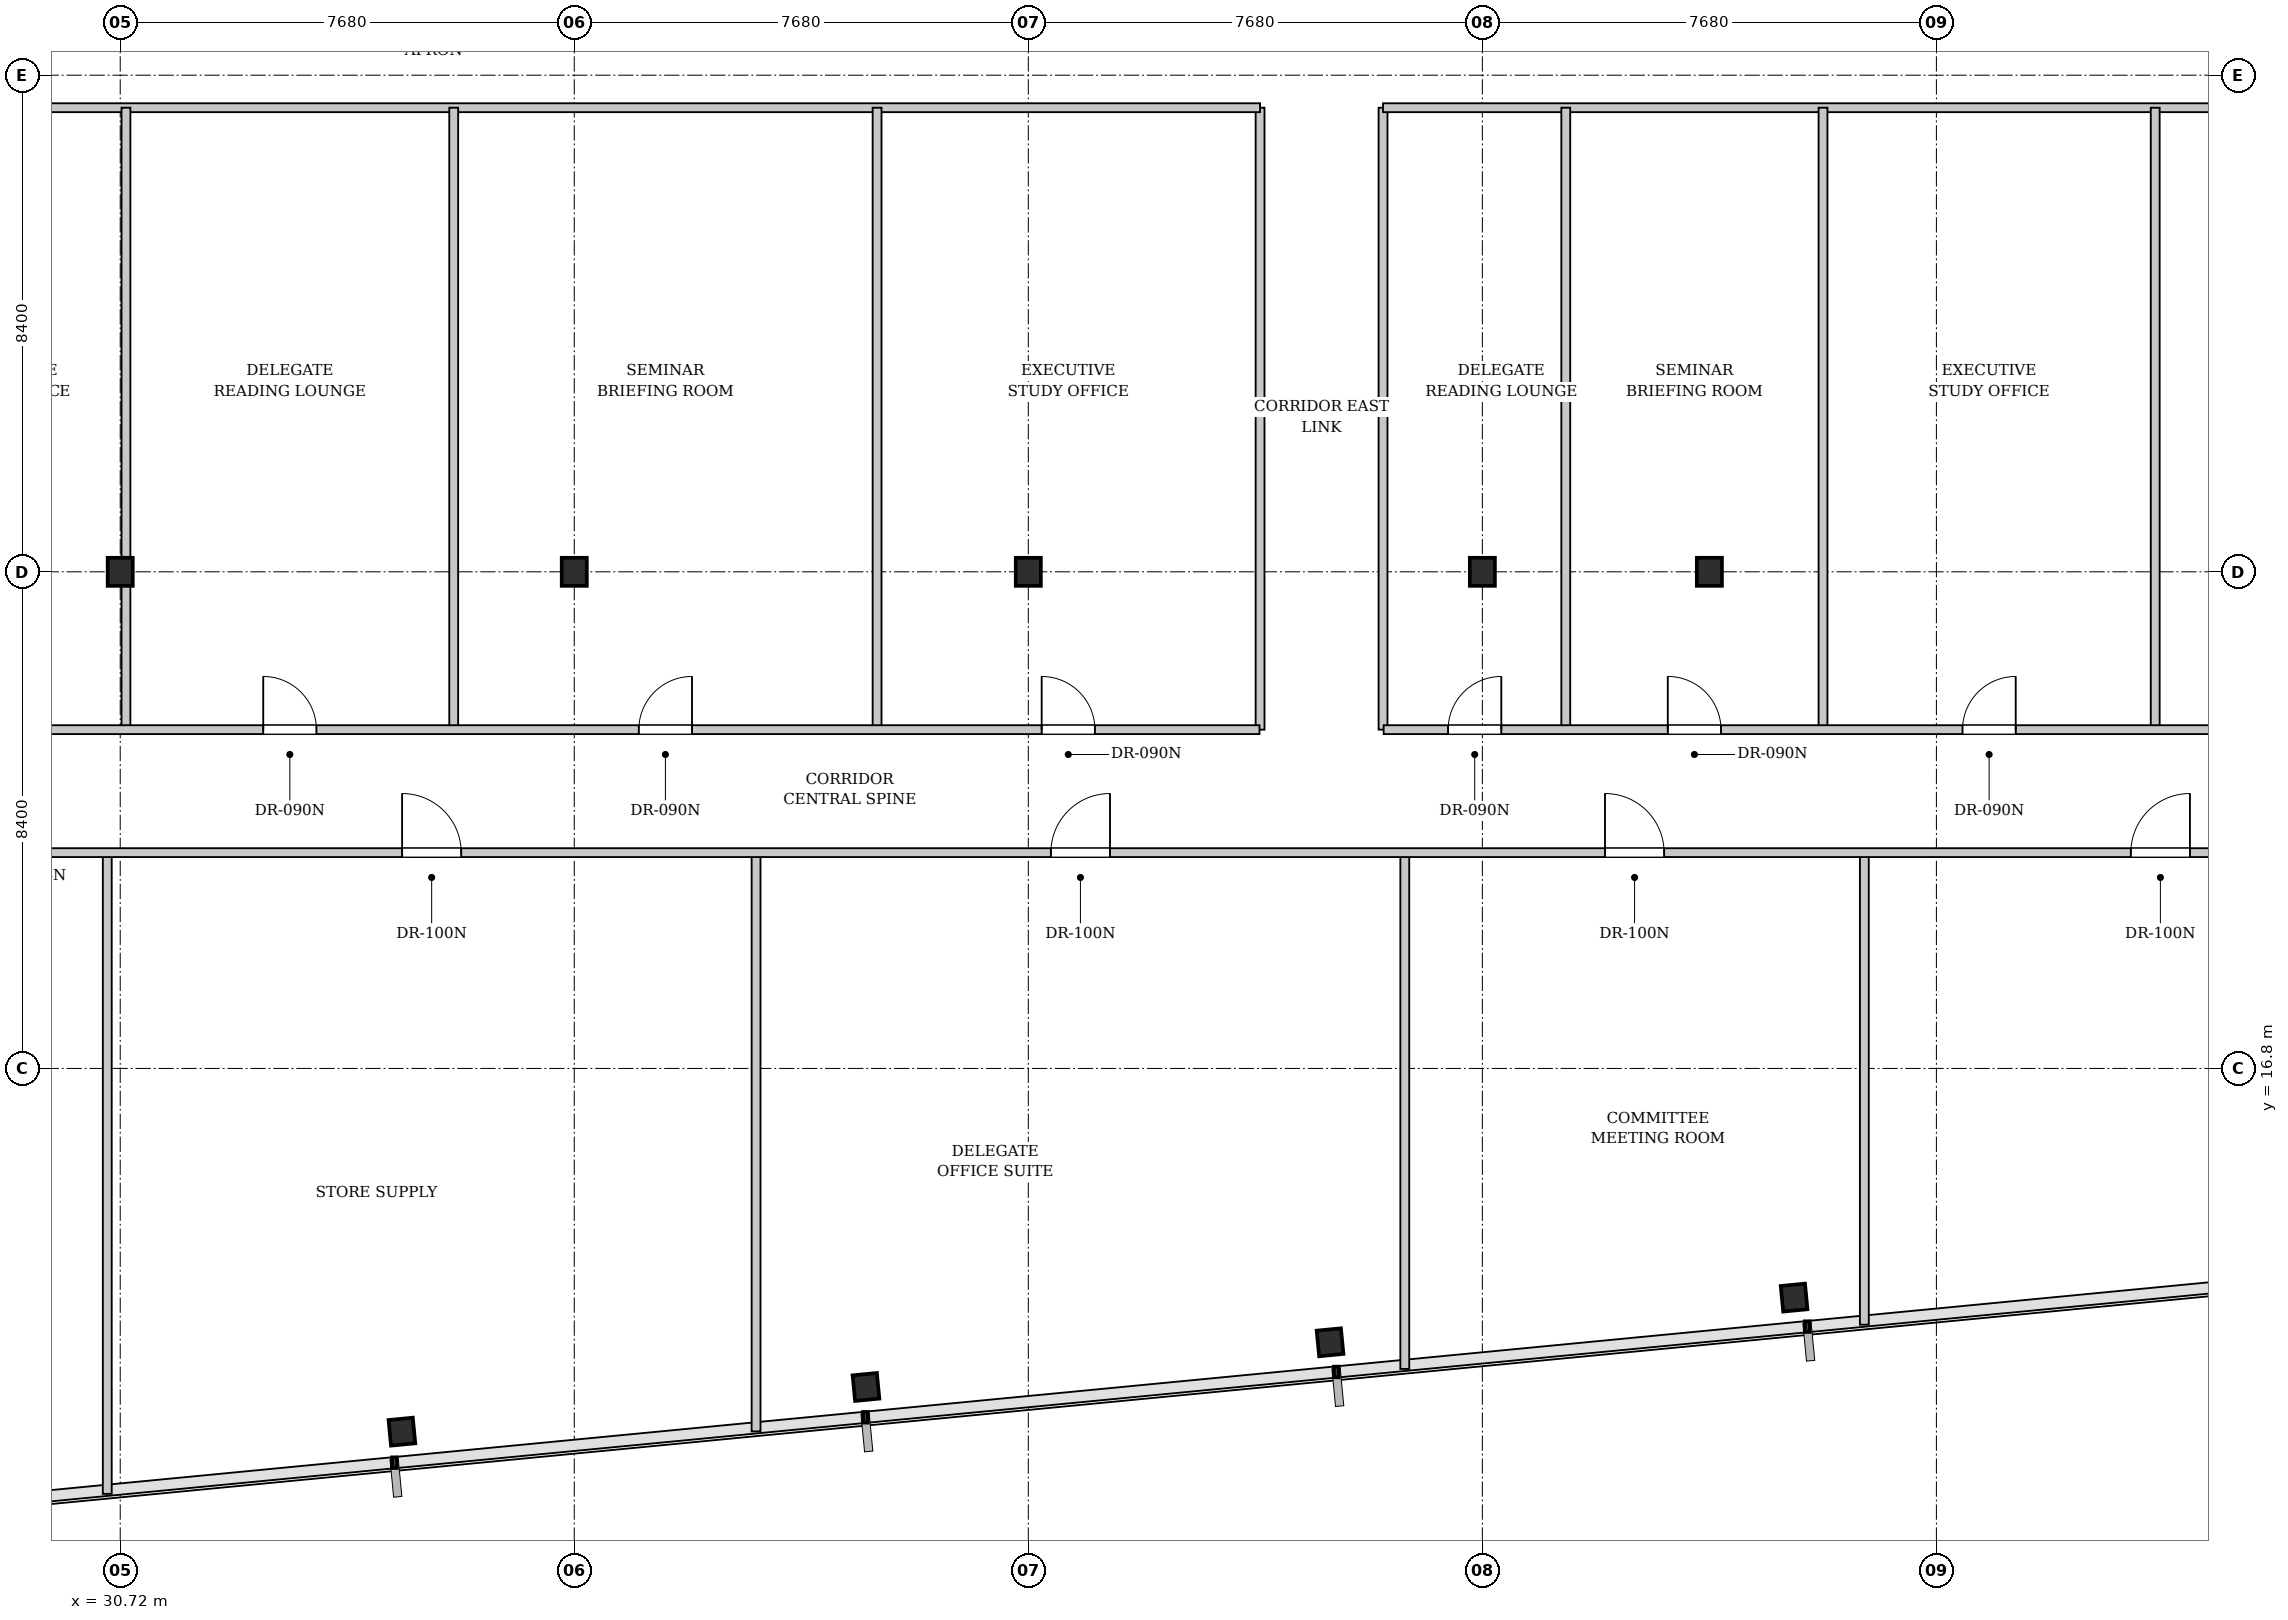
"""IFC4 building model, lengths in metres.
Left out: names, types, materials, properties, quantities, classifications, styles, units other than length and angle.
Written with IfcOpenShell. Run it as: python <this file> out.ifc"""

import sys

from ifc_helpers import new_model, si_unit, direction, frame, frame_2d, origin, origin_2d, place, context, subcontext, project, spatial, rectangle, i_section, extrude, element, fill, save


model = new_model("IFC4")
c1 = context("Model", 3, precision=1e-05, world=origin(), true_north=direction((0.0, 1.0)))
c2 = subcontext(c1, "Body", "Model", "MODEL_VIEW")
j1 = project(units=[si_unit("LENGTHUNIT", "METRE"), si_unit("PLANEANGLEUNIT", "RADIAN")], contexts=[c1])
p1 = place(None, origin())
s1 = spatial("IfcSite", under=j1, at=p1, CompositionType="ELEMENT")
p2 = place(p1, origin())
s2 = spatial("IfcBuilding", under=s1, at=p2, CompositionType="ELEMENT")
p3 = place(p2, frame((0.0, 0.0, 123.7)))
s3 = spatial("IfcBuildingStorey", under=s2, at=p3, CompositionType="ELEMENT", Elevation=123.7)
for number, where, z_axis, x_axis in (
    (1, (30.72, 25.2, 0.0), (0.0, 0.0, 1.0), (1.0, 0.0, 0.0)),
    (2, (38.4, 25.2, 0.0), (0.0, 0.0, 1.0), (1.0, 0.0, 0.0)),
    (3, (46.08, 25.2, 0.0), (0.0, 0.0, 1.0), (1.0, 0.0, 0.0)),
    (4, (53.76, 25.2, 0.0), (0.0, 0.0, 1.0), (1.0, 0.0, 0.0)),
    (5, (57.6, 25.2, 0.0), (0.0, 0.0, 1.0), (1.0, 0.0, 0.0)),
):
    element("IfcColumn", number, at=place(p3, frame(where, z_axis=z_axis, x_axis=x_axis)), inside=s3, PredefinedType="COLUMN", context=c2, shape_type="SweptSolid", body=[
        extrude(i_section(OverallWidth=0.424, OverallDepth=0.474, WebThickness=0.047, FlangeThickness=0.077, FilletRadius=0.015, at=origin_2d()), origin(), (0.0, 0.0, 1.0), 3.4),
    ])
for number, where, z_axis, x_axis in (
    (6, (35.485, 10.656, 0.0), (0.0, 0.0, 1.0), (0.995, 0.096, 0.0)),
    (7, (43.334, 11.412, 0.0), (0.0, 0.0, 1.0), (0.995, 0.096, 0.0)),
    (8, (51.184, 12.167, 0.0), (0.0, 0.0, 1.0), (0.995, 0.096, 0.0)),
    (9, (59.033, 12.923, 0.0), (0.0, 0.0, 1.0), (0.995, 0.096, 0.0)),
):
    element("IfcColumn", number, at=place(p3, frame(where, z_axis=z_axis, x_axis=x_axis)), inside=s3, PredefinedType="COLUMN", context=c2, shape_type="SweptSolid", body=[
        extrude(i_section(OverallWidth=0.412, OverallDepth=0.435, WebThickness=0.036, FlangeThickness=0.058, FilletRadius=0.015, at=origin_2d()), origin(), (0.0, 0.0, 1.0), 3.4),
    ])
p4 = place(p3, frame((30.501, 9.604, 0.0), z_axis=(0.0, 0.0, 1.0), x_axis=(0.0, 1.0, 0.0)))
e10 = element("IfcWall", 10, at=p4, inside=s3, PredefinedType="PARTITIONING", context=c2, shape_type="SweptSolid", body=[
    extrude(rectangle(XDim=10.866, YDim=0.15, at=frame_2d((5.433, 0.0))), origin(), (0.0, 0.0, 1.0), 3.18),
])
p5 = place(p3, frame((41.475, 10.66, 0.0), z_axis=(0.0, 0.0, 1.0), x_axis=(0.0, 1.0, 0.0)))
e11 = element("IfcWall", 11, at=p5, inside=s3, PredefinedType="PARTITIONING", context=c2, shape_type="SweptSolid", body=[
    extrude(rectangle(XDim=9.81, YDim=0.15, at=frame_2d((4.905, 0.0))), origin(), (0.0, 0.0, 1.0), 3.18),
])
p6 = place(p3, frame((52.448, 11.717, 0.0), z_axis=(0.0, 0.0, 1.0), x_axis=(0.0, 1.0, 0.0)))
e12 = element("IfcWall", 12, at=p6, inside=s3, PredefinedType="PARTITIONING", context=c2, shape_type="SweptSolid", body=[
    extrude(rectangle(XDim=8.753, YDim=0.15, at=frame_2d((4.376, 0.0))), origin(), (0.0, 0.0, 1.0), 2.525),
])
p7 = place(p3, frame((60.221, 12.465, 0.0), z_axis=(0.0, 0.0, 1.0), x_axis=(0.0, 1.0, 0.0)))
e13 = element("IfcWall", 13, at=p7, inside=s3, PredefinedType="PARTITIONING", context=c2, shape_type="SweptSolid", body=[
    extrude(rectangle(XDim=8.005, YDim=0.15, at=frame_2d((4.002, 0.0))), origin(), (0.0, 0.0, 1.0), 3.18),
])
p8 = place(p3, frame((15.814, 20.45, 0.0), z_axis=(0.0, 0.0, 1.0), x_axis=(1.0, 0.0, 0.0)))
e14 = element("IfcWall", 14, at=p8, inside=s3, PredefinedType="PARTITIONING", context=c2, shape_type="SweptSolid", body=[
    extrude(rectangle(XDim=61.222, YDim=0.15, at=frame_2d((30.611, 0.0))), origin(), (0.0, 0.0, 1.0), 3.18),
])
p9 = place(p8, frame((9.243, 0.0, 0.0)))
e15 = element("IfcOpeningElement", 15, at=p9, cuts=e14, PredefinedType="OPENING", context=c2, shape_type="SweptSolid", body=[
    extrude(rectangle(XDim=1.0, YDim=2.15, at=frame_2d((0.5, 1.075))), frame((0.0, 0.085, 0.0), z_axis=(0.0, -1.0, 0.0), x_axis=(1.0, 0.0, 0.0)), (0.0, 0.0, 1.0), 0.17),
])
p10 = place(p8, frame((19.674, 0.0, 0.0)))
e16 = element("IfcOpeningElement", 16, at=p10, cuts=e14, PredefinedType="OPENING", context=c2, shape_type="SweptSolid", body=[
    extrude(rectangle(XDim=1.0, YDim=2.15, at=frame_2d((0.5, 1.075))), frame((0.0, 0.085, 0.0), z_axis=(0.0, -1.0, 0.0), x_axis=(1.0, 0.0, 0.0)), (0.0, 0.0, 1.0), 0.17),
])
p11 = place(p8, frame((30.647, 0.0, 0.0)))
e17 = element("IfcOpeningElement", 17, at=p11, cuts=e14, PredefinedType="OPENING", context=c2, shape_type="SweptSolid", body=[
    extrude(rectangle(XDim=1.0, YDim=2.15, at=frame_2d((0.5, 1.075))), frame((0.0, 0.085, 0.0), z_axis=(0.0, -1.0, 0.0), x_axis=(1.0, 0.0, 0.0)), (0.0, 0.0, 1.0), 0.17),
])
p12 = place(p8, frame((40.021, 0.0, 0.0)))
e18 = element("IfcOpeningElement", 18, at=p12, cuts=e14, PredefinedType="OPENING", context=c2, shape_type="SweptSolid", body=[
    extrude(rectangle(XDim=1.0, YDim=2.15, at=frame_2d((0.5, 1.075))), frame((0.0, 0.085, 0.0), z_axis=(0.0, -1.0, 0.0), x_axis=(1.0, 0.0, 0.0)), (0.0, 0.0, 1.0), 0.17),
])
p13 = place(p8, frame((48.914, 0.0, 0.0)))
e19 = element("IfcOpeningElement", 19, at=p13, cuts=e14, PredefinedType="OPENING", context=c2, shape_type="SweptSolid", body=[
    extrude(rectangle(XDim=1.0, YDim=2.15, at=frame_2d((0.5, 1.075))), frame((0.0, 0.085, 0.0), z_axis=(0.0, -1.0, 0.0), x_axis=(1.0, 0.0, 0.0)), (0.0, 0.0, 1.0), 0.17),
])
for number, where, z_axis, x_axis in (
    (20, (50.0, 22.53, 0.0), (0.0, 0.0, 1.0), (0.0, 1.0, 0.0)),
    (21, (52.08, 22.53, 0.0), (0.0, 0.0, 1.0), (0.0, 1.0, 0.0)),
):
    element("IfcWall", number, at=place(p3, frame(where, z_axis=z_axis, x_axis=x_axis)), inside=s3, PredefinedType="PARTITIONING", context=c2, shape_type="SweptSolid", body=[
        extrude(rectangle(XDim=10.52, YDim=0.15, at=frame_2d((5.26, 0.0))), origin(), (0.0, 0.0, 1.0), 3.18),
    ])
p14 = place(p3, frame((26.88, 33.05, 0.0), z_axis=(0.0, 0.0, 1.0), x_axis=(1.0, 0.0, 0.0)))
e22 = element("IfcWall", 22, at=p14, inside=s3, PredefinedType="PARTITIONING", context=c2, shape_type="SweptSolid", body=[
    extrude(rectangle(XDim=23.12, YDim=0.15, at=frame_2d((11.56, 0.0))), origin(), (0.0, 0.0, 1.0), 3.18),
])
p15 = place(p3, frame((52.08, 33.05, 0.0), z_axis=(0.0, 0.0, 1.0), x_axis=(1.0, 0.0, 0.0)))
e23 = element("IfcWall", 23, at=p15, inside=s3, PredefinedType="PARTITIONING", context=c2, shape_type="SweptSolid", body=[
    extrude(rectangle(XDim=18.156, YDim=0.15, at=frame_2d((9.078, 0.0))), origin(), (0.0, 0.0, 1.0), 2.525),
])
p16 = place(p3, frame((30.817, 22.53, 0.0), z_axis=(0.0, 0.0, 1.0), x_axis=(0.0, 1.0, 0.0)))
e24 = element("IfcWall", 24, at=p16, inside=s3, PredefinedType="PARTITIONING", context=c2, shape_type="SweptSolid", body=[
    extrude(rectangle(XDim=10.52, YDim=0.15, at=frame_2d((5.26, 0.0))), origin(), (0.0, 0.0, 1.0), 2.525),
])
for number, where, z_axis, x_axis in (
    (25, (36.361, 22.53, 0.0), (0.0, 0.0, 1.0), (0.0, 1.0, 0.0)),
    (26, (43.522, 22.53, 0.0), (0.0, 0.0, 1.0), (0.0, 1.0, 0.0)),
):
    element("IfcWall", number, at=place(p3, frame(where, z_axis=z_axis, x_axis=x_axis)), inside=s3, PredefinedType="PARTITIONING", context=c2, shape_type="SweptSolid", body=[
        extrude(rectangle(XDim=10.52, YDim=0.15, at=frame_2d((5.26, 0.0))), origin(), (0.0, 0.0, 1.0), 3.18),
    ])
p17 = place(p3, frame((26.89, 22.53, 0.0), z_axis=(0.0, 0.0, 1.0), x_axis=(1.0, 0.0, 0.0)))
e27 = element("IfcWall", 27, at=p17, inside=s3, PredefinedType="PARTITIONING", context=c2, shape_type="SweptSolid", body=[
    extrude(rectangle(XDim=23.1, YDim=0.15, at=frame_2d((11.55, 0.0))), origin(), (0.0, 0.0, 1.0), 3.18),
])
p18 = place(p17, frame((1.513, 0.0, 0.0)))
e28 = element("IfcOpeningElement", 28, at=p18, cuts=e27, PredefinedType="OPENING", context=c2, shape_type="SweptSolid", body=[
    extrude(rectangle(XDim=0.9, YDim=2.15, at=frame_2d((0.45, 1.075))), frame((0.0, 0.085, 0.0), z_axis=(0.0, -1.0, 0.0), x_axis=(1.0, 0.0, 0.0)), (0.0, 0.0, 1.0), 0.17),
])
p19 = place(p17, frame((6.249, 0.0, 0.0)))
e29 = element("IfcOpeningElement", 29, at=p19, cuts=e27, PredefinedType="OPENING", context=c2, shape_type="SweptSolid", body=[
    extrude(rectangle(XDim=0.9, YDim=2.15, at=frame_2d((0.45, 1.075))), frame((0.0, 0.085, 0.0), z_axis=(0.0, -1.0, 0.0), x_axis=(1.0, 0.0, 0.0)), (0.0, 0.0, 1.0), 0.17),
])
p20 = place(p17, frame((12.602, 0.0, 0.0)))
e30 = element("IfcOpeningElement", 30, at=p20, cuts=e27, PredefinedType="OPENING", context=c2, shape_type="SweptSolid", body=[
    extrude(rectangle(XDim=0.9, YDim=2.15, at=frame_2d((0.45, 1.075))), frame((0.0, 0.085, 0.0), z_axis=(0.0, -1.0, 0.0), x_axis=(1.0, 0.0, 0.0)), (0.0, 0.0, 1.0), 0.17),
])
p21 = place(p17, frame((19.416, 0.0, 0.0)))
e31 = element("IfcOpeningElement", 31, at=p21, cuts=e27, PredefinedType="OPENING", context=c2, shape_type="SweptSolid", body=[
    extrude(rectangle(XDim=0.9, YDim=2.15, at=frame_2d((0.45, 1.075))), frame((0.0, 0.085, 0.0), z_axis=(0.0, -1.0, 0.0), x_axis=(1.0, 0.0, 0.0)), (0.0, 0.0, 1.0), 0.17),
])
for number, where, z_axis, x_axis in (
    (32, (55.171, 22.53, 0.0), (0.0, 0.0, 1.0), (0.0, 1.0, 0.0)),
    (33, (59.522, 22.53, 0.0), (0.0, 0.0, 1.0), (0.0, 1.0, 0.0)),
    (34, (65.141, 22.53, 0.0), (0.0, 0.0, 1.0), (0.0, 1.0, 0.0)),
):
    element("IfcWall", number, at=place(p3, frame(where, z_axis=z_axis, x_axis=x_axis)), inside=s3, PredefinedType="PARTITIONING", context=c2, shape_type="SweptSolid", body=[
        extrude(rectangle(XDim=10.52, YDim=0.15, at=frame_2d((5.26, 0.0))), origin(), (0.0, 0.0, 1.0), 3.18),
    ])
p22 = place(p3, frame((52.09, 22.53, 0.0), z_axis=(0.0, 0.0, 1.0), x_axis=(1.0, 0.0, 0.0)))
e35 = element("IfcWall", 35, at=p22, inside=s3, PredefinedType="PARTITIONING", context=c2, shape_type="SweptSolid", body=[
    extrude(rectangle(XDim=18.126, YDim=0.15, at=frame_2d((9.063, 0.0))), origin(), (0.0, 0.0, 1.0), 3.18),
])
p23 = place(p22, frame((1.091, 0.0, 0.0)))
e36 = element("IfcOpeningElement", 36, at=p23, cuts=e35, PredefinedType="OPENING", context=c2, shape_type="SweptSolid", body=[
    extrude(rectangle(XDim=0.9, YDim=2.15, at=frame_2d((0.45, 1.075))), frame((0.0, 0.085, 0.0), z_axis=(0.0, -1.0, 0.0), x_axis=(1.0, 0.0, 0.0)), (0.0, 0.0, 1.0), 0.17),
])
p24 = place(p22, frame((4.806, 0.0, 0.0)))
e37 = element("IfcOpeningElement", 37, at=p24, cuts=e35, PredefinedType="OPENING", context=c2, shape_type="SweptSolid", body=[
    extrude(rectangle(XDim=0.9, YDim=2.15, at=frame_2d((0.45, 1.075))), frame((0.0, 0.085, 0.0), z_axis=(0.0, -1.0, 0.0), x_axis=(1.0, 0.0, 0.0)), (0.0, 0.0, 1.0), 0.17),
])
p25 = place(p22, frame((9.792, 0.0, 0.0)))
e38 = element("IfcOpeningElement", 38, at=p25, cuts=e35, PredefinedType="OPENING", context=c2, shape_type="SweptSolid", body=[
    extrude(rectangle(XDim=0.9, YDim=2.15, at=frame_2d((0.45, 1.075))), frame((0.0, 0.085, 0.0), z_axis=(0.0, -1.0, 0.0), x_axis=(1.0, 0.0, 0.0)), (0.0, 0.0, 1.0), 0.17),
])
p26 = place(p22, frame((15.138, 0.0, 0.0)))
e39 = element("IfcOpeningElement", 39, at=p26, cuts=e35, PredefinedType="OPENING", context=c2, shape_type="SweptSolid", body=[
    extrude(rectangle(XDim=0.9, YDim=2.15, at=frame_2d((0.45, 1.075))), frame((0.0, 0.085, 0.0), z_axis=(0.0, -1.0, 0.0), x_axis=(1.0, 0.0, 0.0)), (0.0, 0.0, 1.0), 0.17),
])
p27 = place(p10, origin())
e40 = element("IfcDoor", 40, at=p27, inside=s3, OperationType="SINGLE_SWING_LEFT", PredefinedType="DOOR", context=c2, shape_type="SweptSolid", body=[
    extrude(rectangle(XDim=1.0, YDim=2.15, at=frame_2d((0.5, 1.075))), frame((0.0, 0.025, 0.0), z_axis=(0.0, -1.0, 0.0), x_axis=(1.0, 0.0, 0.0)), (0.0, 0.0, 1.0), 0.05),
])
fill(e16, e40)
p28 = place(p11, origin())
e41 = element("IfcDoor", 41, at=p28, inside=s3, OperationType="SINGLE_SWING_RIGHT", PredefinedType="DOOR", context=c2, shape_type="SweptSolid", body=[
    extrude(rectangle(XDim=1.0, YDim=2.15, at=frame_2d((0.5, 1.075))), frame((0.0, 0.025, 0.0), z_axis=(0.0, -1.0, 0.0), x_axis=(1.0, 0.0, 0.0)), (0.0, 0.0, 1.0), 0.05),
])
fill(e17, e41)
p29 = place(p12, origin())
e42 = element("IfcDoor", 42, at=p29, inside=s3, OperationType="SINGLE_SWING_LEFT", PredefinedType="DOOR", context=c2, shape_type="SweptSolid", body=[
    extrude(rectangle(XDim=1.0, YDim=2.15, at=frame_2d((0.5, 1.075))), frame((0.0, 0.025, 0.0), z_axis=(0.0, -1.0, 0.0), x_axis=(1.0, 0.0, 0.0)), (0.0, 0.0, 1.0), 0.05),
])
fill(e18, e42)
p30 = place(p13, origin())
e43 = element("IfcDoor", 43, at=p30, inside=s3, OperationType="SINGLE_SWING_RIGHT", PredefinedType="DOOR", context=c2, shape_type="SweptSolid", body=[
    extrude(rectangle(XDim=1.0, YDim=2.15, at=frame_2d((0.5, 1.075))), frame((0.0, 0.025, 0.0), z_axis=(0.0, -1.0, 0.0), x_axis=(1.0, 0.0, 0.0)), (0.0, 0.0, 1.0), 0.05),
])
fill(e19, e43)
p31 = place(p19, origin())
e44 = element("IfcDoor", 44, at=p31, inside=s3, OperationType="SINGLE_SWING_LEFT", PredefinedType="DOOR", context=c2, shape_type="SweptSolid", body=[
    extrude(rectangle(XDim=0.9, YDim=2.15, at=frame_2d((0.45, 1.075))), frame((0.0, 0.025, 0.0), z_axis=(0.0, -1.0, 0.0), x_axis=(1.0, 0.0, 0.0)), (0.0, 0.0, 1.0), 0.05),
])
fill(e29, e44)
p32 = place(p20, origin())
e45 = element("IfcDoor", 45, at=p32, inside=s3, OperationType="SINGLE_SWING_RIGHT", PredefinedType="DOOR", context=c2, shape_type="SweptSolid", body=[
    extrude(rectangle(XDim=0.9, YDim=2.15, at=frame_2d((0.45, 1.075))), frame((0.0, 0.025, 0.0), z_axis=(0.0, -1.0, 0.0), x_axis=(1.0, 0.0, 0.0)), (0.0, 0.0, 1.0), 0.05),
])
fill(e30, e45)
p33 = place(p21, origin())
e46 = element("IfcDoor", 46, at=p33, inside=s3, OperationType="SINGLE_SWING_LEFT", PredefinedType="DOOR", context=c2, shape_type="SweptSolid", body=[
    extrude(rectangle(XDim=0.9, YDim=2.15, at=frame_2d((0.45, 1.075))), frame((0.0, 0.025, 0.0), z_axis=(0.0, -1.0, 0.0), x_axis=(1.0, 0.0, 0.0)), (0.0, 0.0, 1.0), 0.05),
])
fill(e31, e46)
p34 = place(p23, origin())
e47 = element("IfcDoor", 47, at=p34, inside=s3, OperationType="SINGLE_SWING_RIGHT", PredefinedType="DOOR", context=c2, shape_type="SweptSolid", body=[
    extrude(rectangle(XDim=0.9, YDim=2.15, at=frame_2d((0.45, 1.075))), frame((0.0, 0.025, 0.0), z_axis=(0.0, -1.0, 0.0), x_axis=(1.0, 0.0, 0.0)), (0.0, 0.0, 1.0), 0.05),
])
fill(e36, e47)
p35 = place(p24, origin())
e48 = element("IfcDoor", 48, at=p35, inside=s3, OperationType="SINGLE_SWING_LEFT", PredefinedType="DOOR", context=c2, shape_type="SweptSolid", body=[
    extrude(rectangle(XDim=0.9, YDim=2.15, at=frame_2d((0.45, 1.075))), frame((0.0, 0.025, 0.0), z_axis=(0.0, -1.0, 0.0), x_axis=(1.0, 0.0, 0.0)), (0.0, 0.0, 1.0), 0.05),
])
fill(e37, e48)
p36 = place(p25, origin())
e49 = element("IfcDoor", 49, at=p36, inside=s3, OperationType="SINGLE_SWING_RIGHT", PredefinedType="DOOR", context=c2, shape_type="SweptSolid", body=[
    extrude(rectangle(XDim=0.9, YDim=2.15, at=frame_2d((0.45, 1.075))), frame((0.0, 0.025, 0.0), z_axis=(0.0, -1.0, 0.0), x_axis=(1.0, 0.0, 0.0)), (0.0, 0.0, 1.0), 0.05),
])
fill(e38, e49)
save(model, sys.argv[1])
